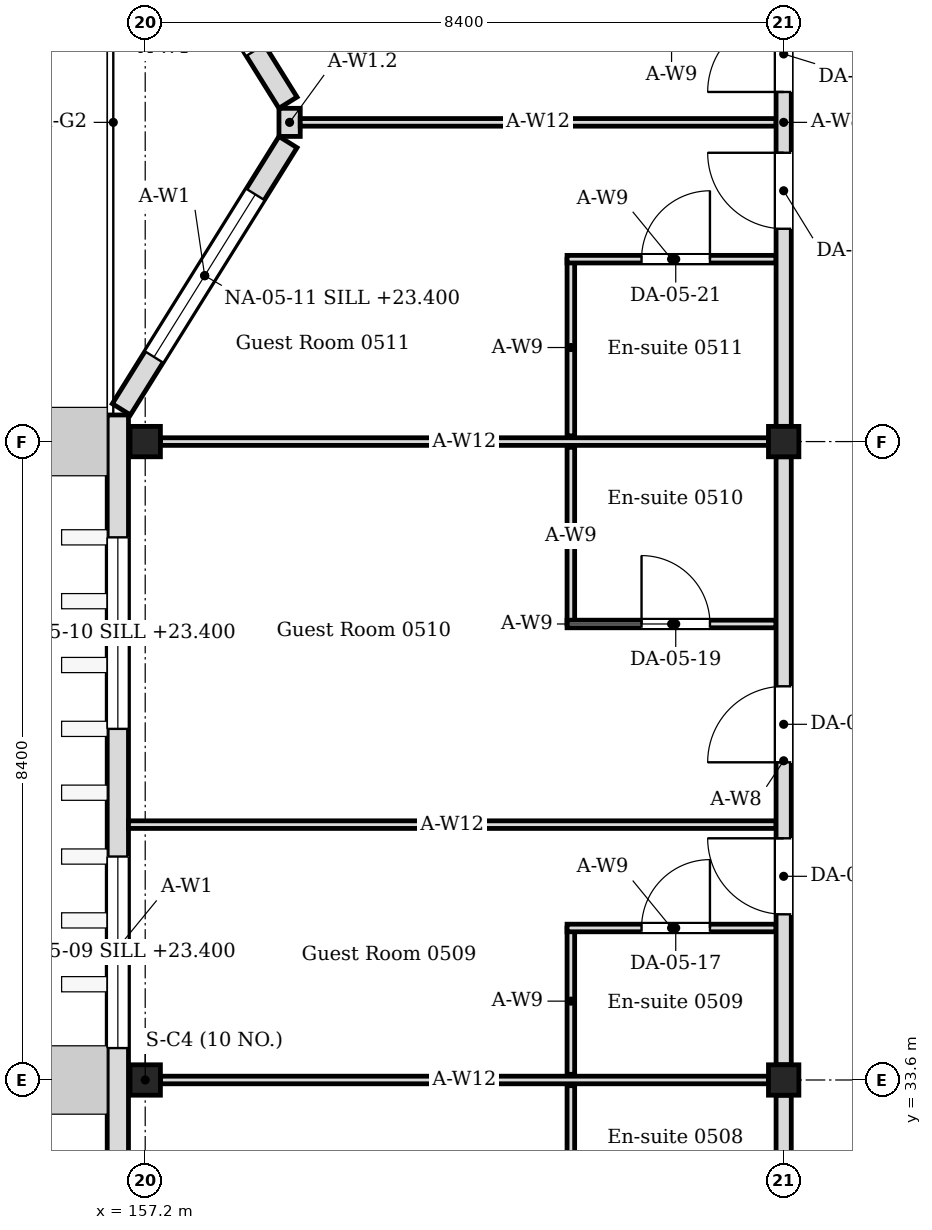
"""IFC4 building model, lengths in metres.
Left out: names, types, materials, properties, quantities, classifications, styles, units other than length and angle.
Written with IfcOpenShell. Run it as: python <this file> out.ifc"""

import sys

from ifc_helpers import new_model, si_unit, direction, frame, frame_2d, origin, origin_2d, place, context, subcontext, project, spatial, rectangle, i_section, extrude, element, fill, save


model = new_model("IFC4")
c1 = context("Model", 3, precision=1e-05, world=origin(), true_north=direction((0.0, 1.0)))
c2 = subcontext(c1, "Body", "Model", "MODEL_VIEW")
j1 = project(units=[si_unit("LENGTHUNIT", "METRE"), si_unit("PLANEANGLEUNIT", "RADIAN")], contexts=[c1])
p1 = place(None, origin())
s1 = spatial("IfcSite", under=j1, at=p1, CompositionType="ELEMENT")
p2 = place(p1, origin())
s2 = spatial("IfcBuilding", under=s1, at=p2, CompositionType="ELEMENT")
p3 = place(p2, frame((0.0, 0.0, 22.8)))
s3 = spatial("IfcBuildingStorey", under=s2, at=p3, CompositionType="ELEMENT", Elevation=22.8)
for number, where, z_axis, x_axis in (
    (1, (157.2, 33.6, 0.0), (0.0, 0.0, 1.0), (1.0, 0.0, 0.0)),
    (2, (157.2, 42.0, 0.0), (0.0, 0.0, 1.0), (1.0, 0.0, 0.0)),
    (3, (165.6, 33.6, 0.0), (0.0, 0.0, 1.0), (1.0, 0.0, 0.0)),
    (4, (165.6, 42.0, 0.0), (0.0, 0.0, 1.0), (1.0, 0.0, 0.0)),
):
    element("IfcColumn", number, at=place(p3, frame(where, z_axis=z_axis, x_axis=x_axis)), inside=s3, PredefinedType="COLUMN", context=c2, shape_type="SweptSolid", body=[
        extrude(i_section(OverallWidth=0.4, OverallDepth=0.4, WebThickness=0.013, FlangeThickness=0.021, FilletRadius=0.022, at=origin_2d()), origin(), (0.0, 0.0, 1.0), 4.2),
    ])
p4 = place(p3, frame((156.84, 16.45, 0.0), z_axis=(0.0, 0.0, 1.0), x_axis=(0.0, 1.0, 0.0)))
e5 = element("IfcWall", 5, at=p4, inside=s3, PredefinedType="SOLIDWALL", context=c2, shape_type="SweptSolid", body=[
    extrude(rectangle(XDim=25.9, YDim=0.28, at=frame_2d((12.95, 0.0))), origin(), (0.0, 0.0, 1.0), 4.05),
])
p5 = place(p4, frame((1.19, 0.0, 0.6)))
e6 = element("IfcOpeningElement", 6, at=p5, cuts=e5, PredefinedType="OPENING", context=c2, shape_type="SweptSolid", body=[
    extrude(rectangle(XDim=2.52, YDim=2.4, at=frame_2d((1.26, 1.2))), frame((0.0, 0.15, 0.0), z_axis=(0.0, -1.0, 0.0), x_axis=(1.0, 0.0, 0.0)), (0.0, 0.0, 1.0), 0.3),
])
p6 = place(p4, frame((5.39, 0.0, 0.6)))
e7 = element("IfcOpeningElement", 7, at=p6, cuts=e5, PredefinedType="OPENING", context=c2, shape_type="SweptSolid", body=[
    extrude(rectangle(XDim=2.52, YDim=2.4, at=frame_2d((1.26, 1.2))), frame((0.0, 0.15, 0.0), z_axis=(0.0, -1.0, 0.0), x_axis=(1.0, 0.0, 0.0)), (0.0, 0.0, 1.0), 0.3),
])
p7 = place(p4, frame((9.17, 0.0, 0.6)))
e8 = element("IfcOpeningElement", 8, at=p7, cuts=e5, PredefinedType="OPENING", context=c2, shape_type="SweptSolid", body=[
    extrude(rectangle(XDim=2.52, YDim=2.4, at=frame_2d((1.26, 1.2))), frame((0.0, 0.15, 0.0), z_axis=(0.0, -1.0, 0.0), x_axis=(1.0, 0.0, 0.0)), (0.0, 0.0, 1.0), 0.3),
])
p8 = place(p4, frame((13.37, 0.0, 0.6)))
e9 = element("IfcOpeningElement", 9, at=p8, cuts=e5, PredefinedType="OPENING", context=c2, shape_type="SweptSolid", body=[
    extrude(rectangle(XDim=2.52, YDim=2.4, at=frame_2d((1.26, 1.2))), frame((0.0, 0.15, 0.0), z_axis=(0.0, -1.0, 0.0), x_axis=(1.0, 0.0, 0.0)), (0.0, 0.0, 1.0), 0.3),
])
p9 = place(p4, frame((17.57, 0.0, 0.6)))
e10 = element("IfcOpeningElement", 10, at=p9, cuts=e5, PredefinedType="OPENING", context=c2, shape_type="SweptSolid", body=[
    extrude(rectangle(XDim=2.52, YDim=2.4, at=frame_2d((1.26, 1.2))), frame((0.0, 0.15, 0.0), z_axis=(0.0, -1.0, 0.0), x_axis=(1.0, 0.0, 0.0)), (0.0, 0.0, 1.0), 0.3),
])
p10 = place(p4, frame((21.77, 0.0, 0.6)))
e11 = element("IfcOpeningElement", 11, at=p10, cuts=e5, PredefinedType="OPENING", context=c2, shape_type="SweptSolid", body=[
    extrude(rectangle(XDim=2.52, YDim=2.4, at=frame_2d((1.26, 1.2))), frame((0.0, 0.15, 0.0), z_axis=(0.0, -1.0, 0.0), x_axis=(1.0, 0.0, 0.0)), (0.0, 0.0, 1.0), 0.3),
])
p11 = place(p3, frame((156.886, 42.424, 0.0), z_axis=(0.0, 0.0, 1.0), x_axis=(0.529018946142, 0.848610013271, 0.0)))
e12 = element("IfcWall", 12, at=p11, inside=s3, PredefinedType="SOLIDWALL", context=c2, shape_type="SweptSolid", body=[
    extrude(rectangle(XDim=4.144, YDim=0.28, at=frame_2d((2.072, 0.0))), origin(), (0.0, 0.0, 1.0), 4.05),
])
p12 = place(p11, frame((0.812, 0.0, 0.6)))
e13 = element("IfcOpeningElement", 13, at=p12, cuts=e12, PredefinedType="OPENING", context=c2, shape_type="SweptSolid", body=[
    extrude(rectangle(XDim=2.52, YDim=2.4, at=frame_2d((1.26, 1.2))), frame((0.0, 0.15, 0.0), z_axis=(0.0, -1.0, 0.0), x_axis=(1.0, 0.0, 0.0)), (0.0, 0.0, 1.0), 0.3),
])
p13 = place(p3, frame((159.079, 46.459, 0.0), z_axis=(0.0, 0.0, 1.0), x_axis=(-0.529018946142, 0.848610013271, 0.0)))
e14 = element("IfcWall", 14, at=p13, inside=s3, PredefinedType="SOLIDWALL", context=c2, shape_type="SweptSolid", body=[
    extrude(rectangle(XDim=4.144, YDim=0.28, at=frame_2d((2.072, 0.0))), origin(), (0.0, 0.0, 1.0), 4.05),
])
p14 = place(p13, frame((0.812, 0.0, 0.6)))
e15 = element("IfcOpeningElement", 15, at=p14, cuts=e14, PredefinedType="OPENING", context=c2, shape_type="SweptSolid", body=[
    extrude(rectangle(XDim=2.52, YDim=2.4, at=frame_2d((1.26, 1.2))), frame((0.0, 0.15, 0.0), z_axis=(0.0, -1.0, 0.0), x_axis=(1.0, 0.0, 0.0)), (0.0, 0.0, 1.0), 0.3),
])
p15 = place(p3, frame((159.1, 46.015, 0.0), z_axis=(0.0, 0.0, 1.0), x_axis=(0.0, 1.0, 0.0)))
e16 = element("IfcWall", 16, at=p15, inside=s3, PredefinedType="SOLIDWALL", context=c2, shape_type="SweptSolid", body=[
    extrude(rectangle(XDim=0.37, YDim=0.28, at=frame_2d((0.185, 0.0))), origin(), (0.0, 0.0, 1.0), 3.604),
])
p16 = place(p3, frame((162.8, 31.2, 0.0), z_axis=(0.0, 0.0, 1.0), x_axis=(0.0, 1.0, 0.0)))
e17 = element("IfcWall", 17, at=p16, inside=s3, PredefinedType="PARTITIONING", context=c2, shape_type="SweptSolid", body=[
    extrude(rectangle(XDim=2.325, YDim=0.1, at=frame_2d((1.163, 0.0))), origin(), (0.0, 0.0, 1.0), 4.05),
])
p17 = place(p3, frame((162.8, 33.675, 0.0), z_axis=(0.0, 0.0, 1.0), x_axis=(0.0, 1.0, 0.0)))
e18 = element("IfcWall", 18, at=p17, inside=s3, PredefinedType="PARTITIONING", context=c2, shape_type="SweptSolid", body=[
    extrude(rectangle(XDim=1.925, YDim=0.1, at=frame_2d((0.962, 0.0))), origin(), (0.0, 0.0, 1.0), 4.05),
])
p18 = place(p3, frame((162.75, 35.6, 0.0), z_axis=(0.0, 0.0, 1.0), x_axis=(1.0, 0.0, 0.0)))
e19 = element("IfcWall", 19, at=p18, inside=s3, PredefinedType="PARTITIONING", context=c2, shape_type="SweptSolid", body=[
    extrude(rectangle(XDim=2.75, YDim=0.1, at=frame_2d((1.375, 0.0))), origin(), (0.0, 0.0, 1.0), 4.05),
])
p19 = place(p18, frame((0.98, 0.0, 0.0)))
e20 = element("IfcOpeningElement", 20, at=p19, cuts=e19, PredefinedType="OPENING", context=c2, shape_type="SweptSolid", body=[
    extrude(rectangle(XDim=0.9, YDim=2.1, at=frame_2d((0.45, 1.05))), frame((0.0, 0.06, 0.0), z_axis=(0.0, -1.0, 0.0), x_axis=(1.0, 0.0, 0.0)), (0.0, 0.0, 1.0), 0.12),
])
p20 = place(p3, frame((162.8, 39.6, 0.0), z_axis=(0.0, 0.0, 1.0), x_axis=(0.0, 1.0, 0.0)))
e21 = element("IfcWall", 21, at=p20, inside=s3, PredefinedType="PARTITIONING", context=c2, shape_type="SweptSolid", body=[
    extrude(rectangle(XDim=2.325, YDim=0.1, at=frame_2d((1.163, 0.0))), origin(), (0.0, 0.0, 1.0), 4.05),
])
p21 = place(p3, frame((162.75, 39.6, 0.0), z_axis=(0.0, 0.0, 1.0), x_axis=(1.0, 0.0, 0.0)))
e22 = element("IfcWall", 22, at=p21, inside=s3, PredefinedType="PARTITIONING", context=c2, shape_type="SweptSolid", body=[
    extrude(rectangle(XDim=2.75, YDim=0.1, at=frame_2d((1.375, 0.0))), origin(), (0.0, 0.0, 1.0), 4.05),
])
p22 = place(p21, frame((0.98, 0.0, 0.0)))
e23 = element("IfcOpeningElement", 23, at=p22, cuts=e22, PredefinedType="OPENING", context=c2, shape_type="SweptSolid", body=[
    extrude(rectangle(XDim=0.9, YDim=2.1, at=frame_2d((0.45, 1.05))), frame((0.0, 0.06, 0.0), z_axis=(0.0, -1.0, 0.0), x_axis=(1.0, 0.0, 0.0)), (0.0, 0.0, 1.0), 0.12),
])
p23 = place(p3, frame((162.8, 42.075, 0.0), z_axis=(0.0, 0.0, 1.0), x_axis=(0.0, 1.0, 0.0)))
e24 = element("IfcWall", 24, at=p23, inside=s3, PredefinedType="PARTITIONING", context=c2, shape_type="SweptSolid", body=[
    extrude(rectangle(XDim=2.325, YDim=0.1, at=frame_2d((1.163, 0.0))), origin(), (0.0, 0.0, 1.0), 4.05),
])
p24 = place(p3, frame((162.75, 44.4, 0.0), z_axis=(0.0, 0.0, 1.0), x_axis=(1.0, 0.0, 0.0)))
e25 = element("IfcWall", 25, at=p24, inside=s3, PredefinedType="PARTITIONING", context=c2, shape_type="SweptSolid", body=[
    extrude(rectangle(XDim=2.75, YDim=0.1, at=frame_2d((1.375, 0.0))), origin(), (0.0, 0.0, 1.0), 4.05),
])
p25 = place(p24, frame((0.98, 0.0, 0.0)))
e26 = element("IfcOpeningElement", 26, at=p25, cuts=e25, PredefinedType="OPENING", context=c2, shape_type="SweptSolid", body=[
    extrude(rectangle(XDim=0.9, YDim=2.1, at=frame_2d((0.45, 1.05))), frame((0.0, 0.06, 0.0), z_axis=(0.0, -1.0, 0.0), x_axis=(1.0, 0.0, 0.0)), (0.0, 0.0, 1.0), 0.12),
])
for number, where, z_axis, x_axis in (
    (27, (157.4, 33.6, 0.0), (0.0, 0.0, 1.0), (1.0, 0.0, 0.0)),
    (28, (157.4, 42.0, 0.0), (0.0, 0.0, 1.0), (1.0, 0.0, 0.0)),
):
    element("IfcWall", number, at=place(p3, frame(where, z_axis=z_axis, x_axis=x_axis)), inside=s3, PredefinedType="PARTITIONING", context=c2, shape_type="SweptSolid", body=[
        extrude(rectangle(XDim=8.0, YDim=0.1, at=frame_2d((4.0, 0.0))), origin(), (0.0, 0.0, 1.0), 3.604),
    ])
p26 = place(p3, frame((156.98, 36.96, 0.0), z_axis=(0.0, 0.0, 1.0), x_axis=(1.0, 0.0, 0.0)))
e29 = element("IfcWall", 29, at=p26, inside=s3, PredefinedType="PARTITIONING", context=c2, shape_type="SweptSolid", body=[
    extrude(rectangle(XDim=8.52, YDim=0.1, at=frame_2d((4.26, 0.0))), origin(), (0.0, 0.0, 1.0), 3.604),
])
p27 = place(p3, frame((159.24, 46.2, 0.0), z_axis=(0.0, 0.0, 1.0), x_axis=(1.0, 0.0, 0.0)))
e30 = element("IfcWall", 30, at=p27, inside=s3, PredefinedType="PARTITIONING", context=c2, shape_type="SweptSolid", body=[
    extrude(rectangle(XDim=6.26, YDim=0.1, at=frame_2d((3.13, 0.0))), origin(), (0.0, 0.0, 1.0), 3.604),
])
p28 = place(p3, frame((165.6, 25.4, 0.0), z_axis=(0.0, 0.0, 1.0), x_axis=(0.0, 1.0, 0.0)))
e31 = element("IfcWall", 31, at=p28, inside=s3, PredefinedType="PARTITIONING", context=c2, shape_type="SweptSolid", body=[
    extrude(rectangle(XDim=8.0, YDim=0.2, at=frame_2d((4.0, 0.0))), origin(), (0.0, 0.0, 1.0), 3.45),
])
p29 = place(p28, frame((1.98, 0.0, 0.0)))
e32 = element("IfcOpeningElement", 32, at=p29, cuts=e31, PredefinedType="OPENING", context=c2, shape_type="SweptSolid", body=[
    extrude(rectangle(XDim=1.0, YDim=2.4, at=frame_2d((0.5, 1.2))), frame((0.0, 0.11, 0.0), z_axis=(0.0, -1.0, 0.0), x_axis=(1.0, 0.0, 0.0)), (0.0, 0.0, 1.0), 0.22),
])
p30 = place(p28, frame((3.98, 0.0, 0.0)))
e33 = element("IfcOpeningElement", 33, at=p30, cuts=e31, PredefinedType="OPENING", context=c2, shape_type="SweptSolid", body=[
    extrude(rectangle(XDim=1.0, YDim=2.4, at=frame_2d((0.5, 1.2))), frame((0.0, 0.11, 0.0), z_axis=(0.0, -1.0, 0.0), x_axis=(1.0, 0.0, 0.0)), (0.0, 0.0, 1.0), 0.22),
])
p31 = place(p3, frame((165.6, 33.8, 0.0), z_axis=(0.0, 0.0, 1.0), x_axis=(0.0, 1.0, 0.0)))
e34 = element("IfcWall", 34, at=p31, inside=s3, PredefinedType="PARTITIONING", context=c2, shape_type="SweptSolid", body=[
    extrude(rectangle(XDim=8.0, YDim=0.2, at=frame_2d((4.0, 0.0))), origin(), (0.0, 0.0, 1.0), 3.45),
])
p32 = place(p31, frame((1.98, 0.0, 0.0)))
e35 = element("IfcOpeningElement", 35, at=p32, cuts=e34, PredefinedType="OPENING", context=c2, shape_type="SweptSolid", body=[
    extrude(rectangle(XDim=1.0, YDim=2.4, at=frame_2d((0.5, 1.2))), frame((0.0, 0.11, 0.0), z_axis=(0.0, -1.0, 0.0), x_axis=(1.0, 0.0, 0.0)), (0.0, 0.0, 1.0), 0.22),
])
p33 = place(p31, frame((3.98, 0.0, 0.0)))
e36 = element("IfcOpeningElement", 36, at=p33, cuts=e34, PredefinedType="OPENING", context=c2, shape_type="SweptSolid", body=[
    extrude(rectangle(XDim=1.0, YDim=2.4, at=frame_2d((0.5, 1.2))), frame((0.0, 0.11, 0.0), z_axis=(0.0, -1.0, 0.0), x_axis=(1.0, 0.0, 0.0)), (0.0, 0.0, 1.0), 0.22),
])
p34 = place(p3, frame((165.6, 42.2, 0.0), z_axis=(0.0, 0.0, 1.0), x_axis=(0.0, 1.0, 0.0)))
e37 = element("IfcWall", 37, at=p34, inside=s3, PredefinedType="PARTITIONING", context=c2, shape_type="SweptSolid", body=[
    extrude(rectangle(XDim=8.0, YDim=0.2, at=frame_2d((4.0, 0.0))), origin(), (0.0, 0.0, 1.0), 3.45),
])
p35 = place(p34, frame((2.6, 0.0, 0.0)))
e38 = element("IfcOpeningElement", 38, at=p35, cuts=e37, PredefinedType="OPENING", context=c2, shape_type="SweptSolid", body=[
    extrude(rectangle(XDim=1.0, YDim=2.4, at=frame_2d((0.5, 1.2))), frame((0.0, 0.11, 0.0), z_axis=(0.0, -1.0, 0.0), x_axis=(1.0, 0.0, 0.0)), (0.0, 0.0, 1.0), 0.22),
])
p36 = place(p34, frame((4.4, 0.0, 0.0)))
e39 = element("IfcOpeningElement", 39, at=p36, cuts=e37, PredefinedType="OPENING", context=c2, shape_type="SweptSolid", body=[
    extrude(rectangle(XDim=1.0, YDim=2.4, at=frame_2d((0.5, 1.2))), frame((0.0, 0.11, 0.0), z_axis=(0.0, -1.0, 0.0), x_axis=(1.0, 0.0, 0.0)), (0.0, 0.0, 1.0), 0.22),
])
p37 = place(p9, origin())
e40 = element("IfcWindow", 40, at=p37, inside=s3, PartitioningType="SINGLE_PANEL", PredefinedType="WINDOW", context=c2, shape_type="SweptSolid", body=[
    extrude(rectangle(XDim=2.52, YDim=2.4, at=frame_2d((1.26, 1.2))), frame((0.0, 0.03, 0.0), z_axis=(0.0, -1.0, 0.0), x_axis=(1.0, 0.0, 0.0)), (0.0, 0.0, 1.0), 0.06),
])
fill(e10, e40)
p38 = place(p10, origin())
e41 = element("IfcWindow", 41, at=p38, inside=s3, PartitioningType="SINGLE_PANEL", PredefinedType="WINDOW", context=c2, shape_type="SweptSolid", body=[
    extrude(rectangle(XDim=2.52, YDim=2.4, at=frame_2d((1.26, 1.2))), frame((0.0, 0.03, 0.0), z_axis=(0.0, -1.0, 0.0), x_axis=(1.0, 0.0, 0.0)), (0.0, 0.0, 1.0), 0.06),
])
fill(e11, e41)
p39 = place(p12, origin())
e42 = element("IfcWindow", 42, at=p39, inside=s3, PartitioningType="SINGLE_PANEL", PredefinedType="WINDOW", context=c2, shape_type="SweptSolid", body=[
    extrude(rectangle(XDim=2.52, YDim=2.4, at=frame_2d((1.26, 1.2))), frame((0.0, 0.03, 0.0), z_axis=(0.0, -1.0, 0.0), x_axis=(1.0, 0.0, 0.0)), (0.0, 0.0, 1.0), 0.06),
])
fill(e13, e42)
p40 = place(p19, origin())
e43 = element("IfcDoor", 43, at=p40, inside=s3, OperationType="SINGLE_SWING_RIGHT", PredefinedType="DOOR", context=c2, shape_type="SweptSolid", body=[
    extrude(rectangle(XDim=0.9, YDim=2.1, at=frame_2d((0.45, 1.05))), frame((0.0, 0.025, 0.0), z_axis=(0.0, -1.0, 0.0), x_axis=(1.0, 0.0, 0.0)), (0.0, 0.0, 1.0), 0.05),
])
fill(e20, e43)
p41 = place(p32, origin())
e44 = element("IfcDoor", 44, at=p41, inside=s3, OperationType="SINGLE_SWING_RIGHT", PredefinedType="DOOR", context=c2, shape_type="SweptSolid", body=[
    extrude(rectangle(XDim=1.0, YDim=2.4, at=frame_2d((0.5, 1.2))), frame((0.0, 0.025, 0.0), z_axis=(0.0, -1.0, 0.0), x_axis=(1.0, 0.0, 0.0)), (0.0, 0.0, 1.0), 0.05),
])
fill(e35, e44)
p42 = place(p22, origin())
e45 = element("IfcDoor", 45, at=p42, inside=s3, OperationType="SINGLE_SWING_LEFT", PredefinedType="DOOR", context=c2, shape_type="SweptSolid", body=[
    extrude(rectangle(XDim=0.9, YDim=2.1, at=frame_2d((0.45, 1.05))), frame((0.0, 0.025, 0.0), z_axis=(0.0, -1.0, 0.0), x_axis=(1.0, 0.0, 0.0)), (0.0, 0.0, 1.0), 0.05),
])
fill(e23, e45)
p43 = place(p33, origin())
e46 = element("IfcDoor", 46, at=p43, inside=s3, OperationType="SINGLE_SWING_LEFT", PredefinedType="DOOR", context=c2, shape_type="SweptSolid", body=[
    extrude(rectangle(XDim=1.0, YDim=2.4, at=frame_2d((0.5, 1.2))), frame((0.0, 0.025, 0.0), z_axis=(0.0, -1.0, 0.0), x_axis=(1.0, 0.0, 0.0)), (0.0, 0.0, 1.0), 0.05),
])
fill(e36, e46)
p44 = place(p25, origin())
e47 = element("IfcDoor", 47, at=p44, inside=s3, OperationType="SINGLE_SWING_RIGHT", PredefinedType="DOOR", context=c2, shape_type="SweptSolid", body=[
    extrude(rectangle(XDim=0.9, YDim=2.1, at=frame_2d((0.45, 1.05))), frame((0.0, 0.025, 0.0), z_axis=(0.0, -1.0, 0.0), x_axis=(1.0, 0.0, 0.0)), (0.0, 0.0, 1.0), 0.05),
])
fill(e26, e47)
p45 = place(p35, origin())
e48 = element("IfcDoor", 48, at=p45, inside=s3, OperationType="SINGLE_SWING_RIGHT", PredefinedType="DOOR", context=c2, shape_type="SweptSolid", body=[
    extrude(rectangle(XDim=1.0, YDim=2.4, at=frame_2d((0.5, 1.2))), frame((0.0, 0.025, 0.0), z_axis=(0.0, -1.0, 0.0), x_axis=(1.0, 0.0, 0.0)), (0.0, 0.0, 1.0), 0.05),
])
fill(e38, e48)
p46 = place(p36, origin())
e49 = element("IfcDoor", 49, at=p46, inside=s3, OperationType="SINGLE_SWING_LEFT", PredefinedType="DOOR", context=c2, shape_type="SweptSolid", body=[
    extrude(rectangle(XDim=1.0, YDim=2.4, at=frame_2d((0.5, 1.2))), frame((0.0, 0.025, 0.0), z_axis=(0.0, -1.0, 0.0), x_axis=(1.0, 0.0, 0.0)), (0.0, 0.0, 1.0), 0.05),
])
fill(e39, e49)
save(model, sys.argv[1])
